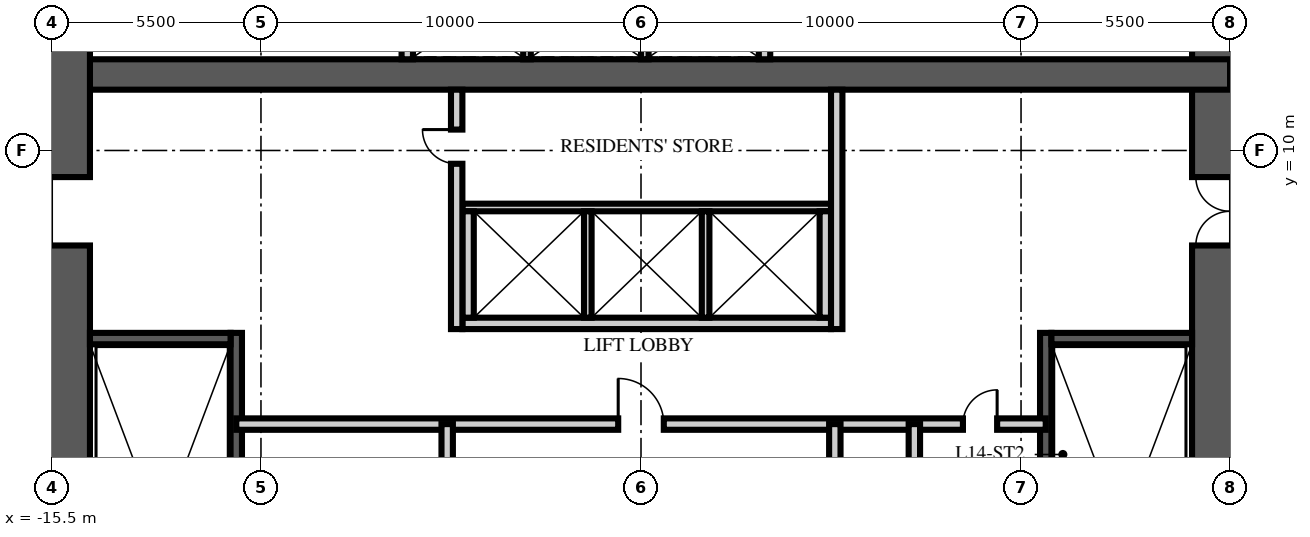
"""IFC4 building model, lengths in metres.
Left out: names, types, materials, properties, quantities, classifications, styles, units other than length and angle.
Written with IfcOpenShell. Run it as: python <this file> out.ifc"""

import sys

from ifc_helpers import new_model, si_unit, direction, frame, frame_2d, origin, place, context, subcontext, project, spatial, rectangle, extrude, element, fill, save


model = new_model("IFC4")
c1 = context("Model", 3, precision=1e-05, world=origin(), true_north=direction((0.0, 1.0)))
c2 = subcontext(c1, "Body", "Model", "MODEL_VIEW")
j1 = project(units=[si_unit("LENGTHUNIT", "METRE"), si_unit("PLANEANGLEUNIT", "RADIAN")], contexts=[c1])
p1 = place(None, origin())
s1 = spatial("IfcSite", under=j1, at=p1, CompositionType="ELEMENT")
p2 = place(p1, origin())
s2 = spatial("IfcBuilding", under=s1, at=p2, CompositionType="ELEMENT")
p3 = place(p2, frame((0.0, 0.0, 58.5)))
s3 = spatial("IfcBuildingStorey", under=s2, at=p3, CompositionType="ELEMENT", Elevation=58.5)
p4 = place(p3, frame((15.5, -15.5, -0.25), z_axis=(0.0, 0.0, 1.0), x_axis=(0.0, 1.0, 0.0)))
e1 = element("IfcWall", 1, at=p4, inside=s3, PredefinedType="SHEAR", context=c2, shape_type="SweptSolid", body=[
    extrude(rectangle(XDim=31.0, YDim=2.0, at=frame_2d((15.5, 0.0))), origin(), (0.0, 0.0, 1.0), 3.75),
])
p5 = place(p4, frame((6.5, 0.0, 0.25)))
e2 = element("IfcOpeningElement", 2, at=p5, cuts=e1, PredefinedType="OPENING", context=c2, shape_type="SweptSolid", body=[
    extrude(rectangle(XDim=1.2, YDim=2.1, at=frame_2d((0.6, 1.05))), frame((0.0, 1.01, 0.0), z_axis=(0.0, -1.0, 0.0), x_axis=(1.0, 0.0, 0.0)), (0.0, 0.0, 1.0), 2.02),
])
p6 = place(p4, frame((23.0, 0.0, 0.25)))
e3 = element("IfcOpeningElement", 3, at=p6, cuts=e1, PredefinedType="OPENING", context=c2, shape_type="SweptSolid", body=[
    extrude(rectangle(XDim=1.8, YDim=2.1, at=frame_2d((0.9, 1.05))), frame((0.0, 1.01, 0.0), z_axis=(0.0, -1.0, 0.0), x_axis=(1.0, 0.0, 0.0)), (0.0, 0.0, 1.0), 2.02),
])
p7 = place(p3, frame((-15.5, 12.0, -0.25), z_axis=(0.0, 0.0, 1.0), x_axis=(1.0, 0.0, 0.0)))
e4 = element("IfcWall", 4, at=p7, inside=s3, PredefinedType="SHEAR", context=c2, shape_type="SweptSolid", body=[
    extrude(rectangle(XDim=31.0, YDim=0.8, at=frame_2d((15.5, 0.0))), origin(), (0.0, 0.0, 1.0), 3.75),
])
p8 = place(p3, frame((-15.5, -15.5, -0.25), z_axis=(0.0, 0.0, 1.0), x_axis=(0.0, 1.0, 0.0)))
e5 = element("IfcWall", 5, at=p8, inside=s3, PredefinedType="SHEAR", context=c2, shape_type="SweptSolid", body=[
    extrude(rectangle(XDim=31.0, YDim=2.0, at=frame_2d((15.5, 0.0))), origin(), (0.0, 0.0, 1.0), 3.75),
])
p9 = place(p8, frame((6.5, 0.0, 0.25)))
e6 = element("IfcOpeningElement", 6, at=p9, cuts=e5, PredefinedType="OPENING", context=c2, shape_type="SweptSolid", body=[
    extrude(rectangle(XDim=1.2, YDim=2.1, at=frame_2d((0.6, 1.05))), frame((0.0, 1.01, 0.0), z_axis=(0.0, -1.0, 0.0), x_axis=(1.0, 0.0, 0.0)), (0.0, 0.0, 1.0), 2.02),
])
p10 = place(p8, frame((23.0, 0.0, 0.25)))
e7 = element("IfcOpeningElement", 7, at=p10, cuts=e5, PredefinedType="OPENING", context=c2, shape_type="SweptSolid", body=[
    extrude(rectangle(XDim=1.8, YDim=2.1, at=frame_2d((0.9, 1.05))), frame((0.0, 1.01, 0.0), z_axis=(0.0, -1.0, 0.0), x_axis=(1.0, 0.0, 0.0)), (0.0, 0.0, 1.0), 2.02),
])
p11 = place(p3, frame((-10.65, -4.9, 0.0), z_axis=(0.0, 0.0, 1.0), x_axis=(0.0, 1.0, 0.0)))
e8 = element("IfcWall", 8, at=p11, inside=s3, PredefinedType="SOLIDWALL", context=c2, shape_type="SweptSolid", body=[
    extrude(rectangle(XDim=10.1, YDim=0.3, at=frame_2d((5.05, 0.0))), origin(), (0.0, 0.0, 1.0), 3.5),
])
p12 = place(p3, frame((-14.5, 5.05, 0.0), z_axis=(0.0, 0.0, 1.0), x_axis=(1.0, 0.0, 0.0)))
e9 = element("IfcWall", 9, at=p12, inside=s3, PredefinedType="SOLIDWALL", context=c2, shape_type="SweptSolid", body=[
    extrude(rectangle(XDim=3.7, YDim=0.3, at=frame_2d((1.85, 0.0))), origin(), (0.0, 0.0, 1.0), 3.5),
])
p13 = place(p3, frame((10.65, -4.9, 0.0), z_axis=(0.0, 0.0, 1.0), x_axis=(0.0, 1.0, 0.0)))
e10 = element("IfcWall", 10, at=p13, inside=s3, PredefinedType="SOLIDWALL", context=c2, shape_type="SweptSolid", body=[
    extrude(rectangle(XDim=10.1, YDim=0.3, at=frame_2d((5.05, 0.0))), origin(), (0.0, 0.0, 1.0), 3.5),
])
p14 = place(p3, frame((14.5, 5.05, 0.0), z_axis=(0.0, 0.0, 1.0), x_axis=(-1.0, 0.0, 0.0)))
e11 = element("IfcWall", 11, at=p14, inside=s3, PredefinedType="SOLIDWALL", context=c2, shape_type="SweptSolid", body=[
    extrude(rectangle(XDim=3.7, YDim=0.3, at=frame_2d((1.85, 0.0))), origin(), (0.0, 0.0, 1.0), 3.5),
])
p15 = place(p3, frame((-4.7, 5.45, 0.0), z_axis=(0.0, 0.0, 1.0), x_axis=(1.0, 0.0, 0.0)))
e12 = element("IfcWall", 12, at=p15, inside=s3, PredefinedType="PARTITIONING", context=c2, shape_type="SweptSolid", body=[
    extrude(rectangle(XDim=9.7, YDim=0.3, at=frame_2d((4.85, 0.0))), origin(), (0.0, 0.0, 1.0), 3.5),
])
p16 = place(p3, frame((-4.7, 8.5, 0.0), z_axis=(0.0, 0.0, 1.0), x_axis=(1.0, 0.0, 0.0)))
e13 = element("IfcWall", 13, at=p16, inside=s3, PredefinedType="PARTITIONING", context=c2, shape_type="SweptSolid", body=[
    extrude(rectangle(XDim=9.7, YDim=0.2, at=frame_2d((4.85, 0.0))), origin(), (0.0, 0.0, 1.0), 3.5),
])
for number, where, z_axis, x_axis in (
    (14, (-4.55, 5.6, 0.0), (0.0, 0.0, 1.0), (0.0, 1.0, 0.0)),
    (15, (4.85, 5.6, 0.0), (0.0, 0.0, 1.0), (0.0, 1.0, 0.0)),
):
    element("IfcWall", number, at=place(p3, frame(where, z_axis=z_axis, x_axis=x_axis)), inside=s3, PredefinedType="PARTITIONING", context=c2, shape_type="SweptSolid", body=[
        extrude(rectangle(XDim=2.8, YDim=0.3, at=frame_2d((1.4, 0.0))), origin(), (0.0, 0.0, 1.0), 3.5),
    ])
for number, where, z_axis, x_axis in (
    (16, (-1.4, 5.6, 0.0), (0.0, 0.0, 1.0), (0.0, 1.0, 0.0)),
    (17, (1.7, 5.6, 0.0), (0.0, 0.0, 1.0), (0.0, 1.0, 0.0)),
):
    element("IfcWall", number, at=place(p3, frame(where, z_axis=z_axis, x_axis=x_axis)), inside=s3, PredefinedType="PARTITIONING", context=c2, shape_type="SweptSolid", body=[
        extrude(rectangle(XDim=2.8, YDim=0.2, at=frame_2d((1.4, 0.0))), origin(), (0.0, 0.0, 1.0), 3.5),
    ])
for number, where, z_axis, x_axis in (
    (18, (-6.15, 12.4, 0.0), (0.0, 0.0, 1.0), (0.0, 1.0, 0.0)),
    (19, (3.25, 12.4, 0.0), (0.0, 0.0, 1.0), (0.0, 1.0, 0.0)),
):
    element("IfcWall", number, at=place(p3, frame(where, z_axis=z_axis, x_axis=x_axis)), inside=s3, PredefinedType="PARTITIONING", context=c2, shape_type="SweptSolid", body=[
        extrude(rectangle(XDim=2.1, YDim=0.3, at=frame_2d((1.05, 0.0))), origin(), (0.0, 0.0, 1.0), 3.5),
    ])
for number, where, z_axis, x_axis in (
    (20, (-3.0, 12.4, 0.0), (0.0, 0.0, 1.0), (0.0, 1.0, 0.0)),
    (21, (0.1, 12.4, 0.0), (0.0, 0.0, 1.0), (0.0, 1.0, 0.0)),
):
    element("IfcWall", number, at=place(p3, frame(where, z_axis=z_axis, x_axis=x_axis)), inside=s3, PredefinedType="PARTITIONING", context=c2, shape_type="SweptSolid", body=[
        extrude(rectangle(XDim=2.1, YDim=0.2, at=frame_2d((1.05, 0.0))), origin(), (0.0, 0.0, 1.0), 3.5),
    ])
p17 = place(p3, frame((-10.65, 2.8, 0.0), z_axis=(0.0, 0.0, 1.0), x_axis=(1.0, 0.0, 0.0)))
e22 = element("IfcWall", 22, at=p17, inside=s3, PredefinedType="PARTITIONING", context=c2, shape_type="SweptSolid", body=[
    extrude(rectangle(XDim=21.3, YDim=0.3, at=frame_2d((10.65, 0.0))), origin(), (0.0, 0.0, 1.0), 3.5),
])
p18 = place(p17, frame((10.05, 0.0, 0.0)))
e23 = element("IfcOpeningElement", 23, at=p18, cuts=e22, PredefinedType="OPENING", context=c2, shape_type="SweptSolid", body=[
    extrude(rectangle(XDim=1.2, YDim=2.1, at=frame_2d((0.6, 1.05))), frame((0.0, 0.16, 0.0), z_axis=(0.0, -1.0, 0.0), x_axis=(1.0, 0.0, 0.0)), (0.0, 0.0, 1.0), 0.32),
])
p19 = place(p17, frame((19.121, 0.0, 0.0)))
e24 = element("IfcOpeningElement", 24, at=p19, cuts=e22, PredefinedType="OPENING", context=c2, shape_type="SweptSolid", body=[
    extrude(rectangle(XDim=0.9, YDim=2.1, at=frame_2d((0.45, 1.05))), frame((0.0, 0.16, 0.0), z_axis=(0.0, -1.0, 0.0), x_axis=(1.0, 0.0, 0.0)), (0.0, 0.0, 1.0), 0.32),
])
p20 = place(p3, frame((-5.1, -6.65, 0.0), z_axis=(0.0, 0.0, 1.0), x_axis=(0.0, 1.0, 0.0)))
e25 = element("IfcWall", 25, at=p20, inside=s3, PredefinedType="PARTITIONING", context=c2, shape_type="SweptSolid", body=[
    extrude(rectangle(XDim=9.45, YDim=0.3, at=frame_2d((4.725, 0.0))), origin(), (0.0, 0.0, 1.0), 3.5),
])
p21 = place(p20, frame((2.648, 0.0, 0.0)))
e26 = element("IfcOpeningElement", 26, at=p21, cuts=e25, PredefinedType="OPENING", context=c2, shape_type="SweptSolid", body=[
    extrude(rectangle(XDim=0.9, YDim=2.1, at=frame_2d((0.45, 1.05))), frame((0.0, 0.16, 0.0), z_axis=(0.0, -1.0, 0.0), x_axis=(1.0, 0.0, 0.0)), (0.0, 0.0, 1.0), 0.32),
])
p22 = place(p20, frame((7.373, 0.0, 0.0)))
e27 = element("IfcOpeningElement", 27, at=p22, cuts=e25, PredefinedType="OPENING", context=c2, shape_type="SweptSolid", body=[
    extrude(rectangle(XDim=0.9, YDim=2.1, at=frame_2d((0.45, 1.05))), frame((0.0, 0.16, 0.0), z_axis=(0.0, -1.0, 0.0), x_axis=(1.0, 0.0, 0.0)), (0.0, 0.0, 1.0), 0.32),
])
p23 = place(p3, frame((5.1, -6.65, 0.0), z_axis=(0.0, 0.0, 1.0), x_axis=(0.0, 1.0, 0.0)))
e28 = element("IfcWall", 28, at=p23, inside=s3, PredefinedType="PARTITIONING", context=c2, shape_type="SweptSolid", body=[
    extrude(rectangle(XDim=9.45, YDim=0.3, at=frame_2d((4.725, 0.0))), origin(), (0.0, 0.0, 1.0), 3.5),
])
p24 = place(p23, frame((4.275, 0.0, 0.0)))
e29 = element("IfcOpeningElement", 29, at=p24, cuts=e28, PredefinedType="OPENING", context=c2, shape_type="SweptSolid", body=[
    extrude(rectangle(XDim=0.9, YDim=2.1, at=frame_2d((0.45, 1.05))), frame((0.0, 0.16, 0.0), z_axis=(0.0, -1.0, 0.0), x_axis=(1.0, 0.0, 0.0)), (0.0, 0.0, 1.0), 0.32),
])
p25 = place(p3, frame((7.193, -6.65, 0.0), z_axis=(0.0, 0.0, 1.0), x_axis=(0.0, 1.0, 0.0)))
e30 = element("IfcWall", 30, at=p25, inside=s3, PredefinedType="PARTITIONING", context=c2, shape_type="SweptSolid", body=[
    extrude(rectangle(XDim=9.45, YDim=0.3, at=frame_2d((4.725, 0.0))), origin(), (0.0, 0.0, 1.0), 3.5),
])
p26 = place(p3, frame((-4.85, 5.3, 0.0), z_axis=(0.0, 0.0, 1.0), x_axis=(0.0, 1.0, 0.0)))
e31 = element("IfcWall", 31, at=p26, inside=s3, PredefinedType="PARTITIONING", context=c2, shape_type="SweptSolid", body=[
    extrude(rectangle(XDim=6.3, YDim=0.3, at=frame_2d((3.15, 0.0))), origin(), (0.0, 0.0, 1.0), 3.5),
])
p27 = place(p26, frame((4.35, 0.0, 0.0)))
e32 = element("IfcOpeningElement", 32, at=p27, cuts=e31, PredefinedType="OPENING", context=c2, shape_type="SweptSolid", body=[
    extrude(rectangle(XDim=0.9, YDim=2.1, at=frame_2d((0.45, 1.05))), frame((0.0, 0.16, 0.0), z_axis=(0.0, -1.0, 0.0), x_axis=(1.0, 0.0, 0.0)), (0.0, 0.0, 1.0), 0.32),
])
p28 = place(p3, frame((5.15, 5.3, 0.0), z_axis=(0.0, 0.0, 1.0), x_axis=(0.0, 1.0, 0.0)))
e33 = element("IfcWall", 33, at=p28, inside=s3, PredefinedType="PARTITIONING", context=c2, shape_type="SweptSolid", body=[
    extrude(rectangle(XDim=6.3, YDim=0.3, at=frame_2d((3.15, 0.0))), origin(), (0.0, 0.0, 1.0), 3.5),
])
p29 = place(p10, origin())
e34 = element("IfcDoor", 34, at=p29, inside=s3, OperationType="DOUBLE_DOOR_SINGLE_SWING", PredefinedType="DOOR", context=c2, shape_type="SweptSolid", body=[
    extrude(rectangle(XDim=1.8, YDim=2.1, at=frame_2d((0.9, 1.05))), frame((0.0, 0.025, 0.0), z_axis=(0.0, -1.0, 0.0), x_axis=(1.0, 0.0, 0.0)), (0.0, 0.0, 1.0), 0.05),
])
fill(e7, e34)
p30 = place(p6, origin())
e35 = element("IfcDoor", 35, at=p30, inside=s3, OperationType="DOUBLE_DOOR_SINGLE_SWING", PredefinedType="DOOR", context=c2, shape_type="SweptSolid", body=[
    extrude(rectangle(XDim=1.8, YDim=2.1, at=frame_2d((0.9, 1.05))), frame((0.0, 0.025, 0.0), z_axis=(0.0, -1.0, 0.0), x_axis=(1.0, 0.0, 0.0)), (0.0, 0.0, 1.0), 0.05),
])
fill(e3, e35)
p31 = place(p18, origin())
e36 = element("IfcDoor", 36, at=p31, inside=s3, OperationType="SINGLE_SWING_LEFT", PredefinedType="DOOR", context=c2, shape_type="SweptSolid", body=[
    extrude(rectangle(XDim=1.2, YDim=2.1, at=frame_2d((0.6, 1.05))), frame((0.0, 0.025, 0.0), z_axis=(0.0, -1.0, 0.0), x_axis=(1.0, 0.0, 0.0)), (0.0, 0.0, 1.0), 0.05),
])
fill(e23, e36)
p32 = place(p19, origin())
e37 = element("IfcDoor", 37, at=p32, inside=s3, OperationType="SINGLE_SWING_RIGHT", PredefinedType="DOOR", context=c2, shape_type="SweptSolid", body=[
    extrude(rectangle(XDim=0.9, YDim=2.1, at=frame_2d((0.45, 1.05))), frame((0.0, 0.025, 0.0), z_axis=(0.0, -1.0, 0.0), x_axis=(1.0, 0.0, 0.0)), (0.0, 0.0, 1.0), 0.05),
])
fill(e24, e37)
p33 = place(p27, origin())
e38 = element("IfcDoor", 38, at=p33, inside=s3, OperationType="SINGLE_SWING_RIGHT", PredefinedType="DOOR", context=c2, shape_type="SweptSolid", body=[
    extrude(rectangle(XDim=0.9, YDim=2.1, at=frame_2d((0.45, 1.05))), frame((0.0, 0.025, 0.0), z_axis=(0.0, -1.0, 0.0), x_axis=(1.0, 0.0, 0.0)), (0.0, 0.0, 1.0), 0.05),
])
fill(e32, e38)
save(model, sys.argv[1])
